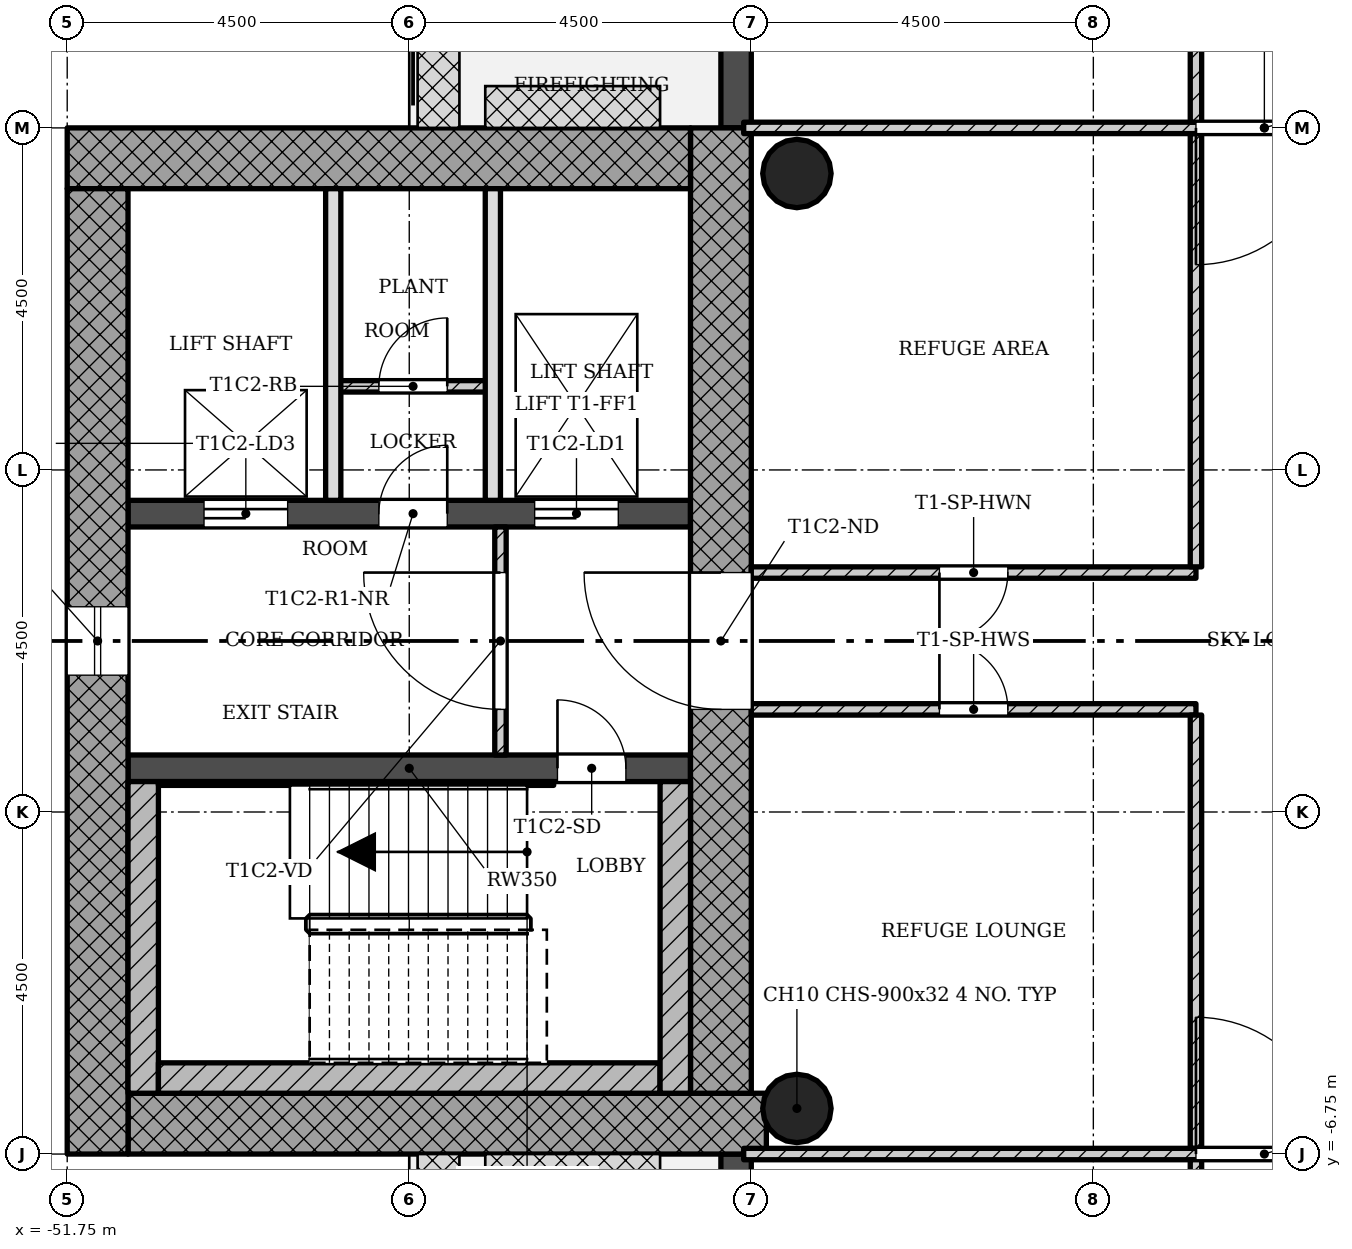
"""IFC4 building model, lengths in metres.
Left out: names, types, materials, properties, quantities, classifications, styles, units other than length and angle.
Written with IfcOpenShell. Run it as: python <this file> out.ifc"""

import sys

from ifc_helpers import new_model, si_unit, direction, frame, frame_2d, origin, origin_2d, place, context, subcontext, project, spatial, rectangle, hollow_circle, extrude, element, fill, save


model = new_model("IFC4")
c1 = context("Model", 3, precision=1e-05, world=origin(), true_north=direction((0.0, 1.0)))
c2 = subcontext(c1, "Body", "Model", "MODEL_VIEW")
j1 = project(units=[si_unit("LENGTHUNIT", "METRE"), si_unit("PLANEANGLEUNIT", "RADIAN")], contexts=[c1])
p1 = place(None, origin())
s1 = spatial("IfcSite", under=j1, at=p1, CompositionType="ELEMENT")
p2 = place(p1, origin())
s2 = spatial("IfcBuilding", under=s1, at=p2, CompositionType="ELEMENT")
p3 = place(p2, frame((0.0, 0.0, 181.3)))
s3 = spatial("IfcBuildingStorey", under=s2, at=p3, CompositionType="ELEMENT", Elevation=181.3)
p4 = place(p3, frame((-50.95, -6.35, 0.0), z_axis=(0.0, 0.0, 1.0), x_axis=(1.0, 0.0, 0.0)))
e1 = element("IfcWall", 1, at=p4, inside=s3, PredefinedType="SHEAR", context=c2, shape_type="SweptSolid", body=[
    extrude(rectangle(XDim=8.398, YDim=0.8, at=frame_2d((4.199, 0.0))), origin(), (0.0, 0.0, 1.0), 4.5),
])
p5 = place(p3, frame((-43.15, -5.95, 0.0), z_axis=(0.0, 0.0, 1.0), x_axis=(0.0, 1.0, 0.0)))
e2 = element("IfcWall", 2, at=p5, inside=s3, PredefinedType="SHEAR", context=c2, shape_type="SweptSolid", body=[
    extrude(rectangle(XDim=12.7, YDim=0.8, at=frame_2d((6.35, 0.0))), origin(), (0.0, 0.0, 1.0), 4.5),
])
p6 = place(p5, frame((5.05, 0.0, 0.0)))
e3 = element("IfcOpeningElement", 3, at=p6, cuts=e2, PredefinedType="OPENING", context=c2, shape_type="SweptSolid", body=[
    extrude(rectangle(XDim=1.8, YDim=2.1, at=frame_2d((0.9, 1.05))), frame((0.0, 0.41, 0.0), z_axis=(0.0, -1.0, 0.0), x_axis=(1.0, 0.0, 0.0)), (0.0, 0.0, 1.0), 0.82),
])
p7 = place(p3, frame((-43.55, 6.35, 0.0), z_axis=(0.0, 0.0, 1.0), x_axis=(-1.0, 0.0, 0.0)))
e4 = element("IfcWall", 4, at=p7, inside=s3, PredefinedType="SHEAR", context=c2, shape_type="SweptSolid", body=[
    extrude(rectangle(XDim=8.2, YDim=0.8, at=frame_2d((4.1, 0.0))), origin(), (0.0, 0.0, 1.0), 4.5),
])
p8 = place(p3, frame((-51.35, 5.95, 0.0), z_axis=(0.0, 0.0, 1.0), x_axis=(0.0, -1.0, 0.0)))
e5 = element("IfcWall", 5, at=p8, inside=s3, PredefinedType="SHEAR", context=c2, shape_type="SweptSolid", body=[
    extrude(rectangle(XDim=12.7, YDim=0.8, at=frame_2d((6.35, 0.0))), origin(), (0.0, 0.0, 1.0), 4.5),
])
p9 = place(p8, frame((5.5, 0.0, 0.45)))
e6 = element("IfcOpeningElement", 6, at=p9, cuts=e5, PredefinedType="OPENING", context=c2, shape_type="SweptSolid", body=[
    extrude(rectangle(XDim=0.9, YDim=2.4, at=frame_2d((0.45, 1.2))), frame((0.0, 0.41, 0.0), z_axis=(0.0, -1.0, 0.0), x_axis=(1.0, 0.0, 0.0)), (0.0, 0.0, 1.0), 0.82),
])
p10 = place(p3, frame((-50.95, -1.675, 0.0), z_axis=(0.0, 0.0, 1.0), x_axis=(1.0, 0.0, 0.0)))
e7 = element("IfcWall", 7, at=p10, inside=s3, PredefinedType="SHEAR", context=c2, shape_type="SweptSolid", body=[
    extrude(rectangle(XDim=7.4, YDim=0.35, at=frame_2d((3.7, 0.0))), origin(), (0.0, 0.0, 1.0), 4.5),
])
p11 = place(p10, frame((5.65, 0.0, 0.0)))
e8 = element("IfcOpeningElement", 8, at=p11, cuts=e7, PredefinedType="OPENING", context=c2, shape_type="SweptSolid", body=[
    extrude(rectangle(XDim=0.9, YDim=2.1, at=frame_2d((0.45, 1.05))), frame((0.0, 0.185, 0.0), z_axis=(0.0, -1.0, 0.0), x_axis=(1.0, 0.0, 0.0)), (0.0, 0.0, 1.0), 0.37),
])
p12 = place(p3, frame((-50.95, 1.675, 0.0), z_axis=(0.0, 0.0, 1.0), x_axis=(1.0, 0.0, 0.0)))
e9 = element("IfcWall", 9, at=p12, inside=s3, PredefinedType="SHEAR", context=c2, shape_type="SweptSolid", body=[
    extrude(rectangle(XDim=7.4, YDim=0.35, at=frame_2d((3.7, 0.0))), origin(), (0.0, 0.0, 1.0), 4.5),
])
p13 = place(p12, frame((5.35, 0.0, 0.0)))
e10 = element("IfcOpeningElement", 10, at=p13, cuts=e9, PredefinedType="OPENING", context=c2, shape_type="SweptSolid", body=[
    extrude(rectangle(XDim=1.1, YDim=2.1, at=frame_2d((0.55, 1.05))), frame((0.0, 0.185, 0.0), z_axis=(0.0, -1.0, 0.0), x_axis=(1.0, 0.0, 0.0)), (0.0, 0.0, 1.0), 0.37),
])
p14 = place(p12, frame((1.0, 0.0, 0.0)))
e11 = element("IfcOpeningElement", 11, at=p14, cuts=e9, PredefinedType="OPENING", context=c2, shape_type="SweptSolid", body=[
    extrude(rectangle(XDim=1.1, YDim=2.1, at=frame_2d((0.55, 1.05))), frame((0.0, 0.185, 0.0), z_axis=(0.0, -1.0, 0.0), x_axis=(1.0, 0.0, 0.0)), (0.0, 0.0, 1.0), 0.37),
])
p15 = place(p12, frame((3.3, 0.0, 0.0)))
e12 = element("IfcOpeningElement", 12, at=p15, cuts=e9, PredefinedType="OPENING", context=c2, shape_type="SweptSolid", body=[
    extrude(rectangle(XDim=0.9, YDim=2.1, at=frame_2d((0.45, 1.05))), frame((0.0, 0.185, 0.0), z_axis=(0.0, -1.0, 0.0), x_axis=(1.0, 0.0, 0.0)), (0.0, 0.0, 1.0), 0.37),
])
for number, where, z_axis, x_axis in (
    (13, (-42.15, -6.15, 0.0), (0.0, 0.0, 1.0), (1.0, 0.0, 0.0)),
    (14, (-42.15, 6.15, 0.0), (0.0, 0.0, 1.0), (1.0, 0.0, 0.0)),
):
    element("IfcColumn", number, at=place(p3, frame(where, z_axis=z_axis, x_axis=x_axis)), inside=s3, PredefinedType="COLUMN", context=c2, shape_type="SweptSolid", body=[
        extrude(hollow_circle(Radius=0.45, WallThickness=0.032, at=origin_2d()), origin(), (0.0, 0.0, 1.0), 4.5),
    ])
p16 = place(p3, frame((-42.95, -6.75, -0.02), z_axis=(0.0, 0.0, 1.0), x_axis=(0.0, -1.0, 0.0)))
e15 = element("IfcWall", 15, at=p16, inside=s3, PredefinedType="STANDARD", context=c2, shape_type="SweptSolid", body=[
    extrude(rectangle(XDim=4.5, YDim=0.4, at=frame_2d((2.25, 0.0))), origin(), (0.0, 0.0, 1.0), 4.22),
])
p17 = place(p16, frame((1.35, 0.0, 0.02)))
e16 = element("IfcOpeningElement", 16, at=p17, cuts=e15, PredefinedType="OPENING", context=c2, shape_type="SweptSolid", body=[
    extrude(rectangle(XDim=1.8, YDim=2.1, at=frame_2d((0.9, 1.05))), frame((0.0, 0.21, 0.0), z_axis=(0.0, -1.0, 0.0), x_axis=(1.0, 0.0, 0.0)), (0.0, 0.0, 1.0), 0.42),
])
p18 = place(p3, frame((-42.95, 11.25, -0.02), z_axis=(0.0, 0.0, 1.0), x_axis=(0.0, -1.0, 0.0)))
e17 = element("IfcWall", 17, at=p18, inside=s3, PredefinedType="STANDARD", context=c2, shape_type="SweptSolid", body=[
    extrude(rectangle(XDim=4.5, YDim=0.4, at=frame_2d((2.25, 0.0))), origin(), (0.0, 0.0, 1.0), 4.22),
])
p19 = place(p18, frame((1.35, 0.0, 0.02)))
e18 = element("IfcOpeningElement", 18, at=p19, cuts=e17, PredefinedType="OPENING", context=c2, shape_type="SweptSolid", body=[
    extrude(rectangle(XDim=1.8, YDim=2.1, at=frame_2d((0.9, 1.05))), frame((0.0, 0.21, 0.0), z_axis=(0.0, -1.0, 0.0), x_axis=(1.0, 0.0, 0.0)), (0.0, 0.0, 1.0), 0.42),
])
p20 = place(p3, frame((-46.05, 1.5, 0.0), z_axis=(0.0, 0.0, 1.0), x_axis=(0.0, -1.0, 0.0)))
e19 = element("IfcWall", 19, at=p20, inside=s3, PredefinedType="PARTITIONING", context=c2, shape_type="SweptSolid", body=[
    extrude(rectangle(XDim=3.0, YDim=0.15, at=frame_2d((1.5, 0.0))), origin(), (0.0, 0.0, 1.0), 4.08),
])
p21 = place(p20, frame((0.6, 0.0, 0.0)))
e20 = element("IfcOpeningElement", 20, at=p21, cuts=e19, PredefinedType="OPENING", context=c2, shape_type="SweptSolid", body=[
    extrude(rectangle(XDim=1.8, YDim=2.1, at=frame_2d((0.9, 1.05))), frame((0.0, 0.085, 0.0), z_axis=(0.0, -1.0, 0.0), x_axis=(1.0, 0.0, 0.0)), (0.0, 0.0, 1.0), 0.17),
])
for number, where, z_axis, x_axis in (
    (21, (-48.25, 5.95, 0.0), (0.0, 0.0, 1.0), (0.0, -1.0, 0.0)),
    (22, (-46.15, 5.95, 0.0), (0.0, 0.0, 1.0), (0.0, -1.0, 0.0)),
):
    element("IfcWall", number, at=place(p3, frame(where, z_axis=z_axis, x_axis=x_axis)), inside=s3, PredefinedType="SOLIDWALL", context=c2, shape_type="SweptSolid", body=[
        extrude(rectangle(XDim=4.1, YDim=0.2, at=frame_2d((2.05, 0.0))), origin(), (0.0, 0.0, 1.0), 4.08),
    ])
p22 = place(p3, frame((-46.15, 3.35, 0.0), z_axis=(0.0, 0.0, 1.0), x_axis=(-1.0, 0.0, 0.0)))
e23 = element("IfcWall", 23, at=p22, inside=s3, PredefinedType="PARTITIONING", context=c2, shape_type="SweptSolid", body=[
    extrude(rectangle(XDim=2.1, YDim=0.15, at=frame_2d((1.05, 0.0))), origin(), (0.0, 0.0, 1.0), 4.08),
])
p23 = place(p22, frame((0.6, 0.0, 0.0)))
e24 = element("IfcOpeningElement", 24, at=p23, cuts=e23, PredefinedType="OPENING", context=c2, shape_type="SweptSolid", body=[
    extrude(rectangle(XDim=0.9, YDim=2.1, at=frame_2d((0.45, 1.05))), frame((0.0, 0.085, 0.0), z_axis=(0.0, -1.0, 0.0), x_axis=(1.0, 0.0, 0.0)), (0.0, 0.0, 1.0), 0.17),
])
p24 = place(p3, frame((-42.75, 0.9, 0.0), z_axis=(0.0, 0.0, 1.0), x_axis=(1.0, 0.0, 0.0)))
e25 = element("IfcWall", 25, at=p24, inside=s3, PredefinedType="PARTITIONING", context=c2, shape_type="SweptSolid", body=[
    extrude(rectangle(XDim=5.85, YDim=0.15, at=frame_2d((2.925, 0.0))), origin(), (0.0, 0.0, 1.0), 4.08),
])
p25 = place(p24, frame((2.475, 0.0, 0.0)))
e26 = element("IfcOpeningElement", 26, at=p25, cuts=e25, PredefinedType="OPENING", context=c2, shape_type="SweptSolid", body=[
    extrude(rectangle(XDim=0.9, YDim=2.1, at=frame_2d((0.45, 1.05))), frame((0.0, 0.085, 0.0), z_axis=(0.0, -1.0, 0.0), x_axis=(1.0, 0.0, 0.0)), (0.0, 0.0, 1.0), 0.17),
])
p26 = place(p3, frame((-36.9, 0.975, 0.0), z_axis=(0.0, 0.0, 1.0), x_axis=(0.0, 1.0, 0.0)))
e27 = element("IfcWall", 27, at=p26, inside=s3, PredefinedType="PARTITIONING", context=c2, shape_type="SweptSolid", body=[
    extrude(rectangle(XDim=5.7, YDim=0.15, at=frame_2d((2.85, 0.0))), origin(), (0.0, 0.0, 1.0), 4.08),
])
p27 = place(p3, frame((-42.75, -0.9, 0.0), z_axis=(0.0, 0.0, 1.0), x_axis=(1.0, 0.0, 0.0)))
e28 = element("IfcWall", 28, at=p27, inside=s3, PredefinedType="PARTITIONING", context=c2, shape_type="SweptSolid", body=[
    extrude(rectangle(XDim=5.85, YDim=0.15, at=frame_2d((2.925, 0.0))), origin(), (0.0, 0.0, 1.0), 4.08),
])
p28 = place(p27, frame((2.475, 0.0, 0.0)))
e29 = element("IfcOpeningElement", 29, at=p28, cuts=e28, PredefinedType="OPENING", context=c2, shape_type="SweptSolid", body=[
    extrude(rectangle(XDim=0.9, YDim=2.1, at=frame_2d((0.45, 1.05))), frame((0.0, 0.085, 0.0), z_axis=(0.0, -1.0, 0.0), x_axis=(1.0, 0.0, 0.0)), (0.0, 0.0, 1.0), 0.17),
])
p29 = place(p3, frame((-36.9, -6.675, 0.0), z_axis=(0.0, 0.0, 1.0), x_axis=(0.0, 1.0, 0.0)))
e30 = element("IfcWall", 30, at=p29, inside=s3, PredefinedType="PARTITIONING", context=c2, shape_type="SweptSolid", body=[
    extrude(rectangle(XDim=5.7, YDim=0.15, at=frame_2d((2.85, 0.0))), origin(), (0.0, 0.0, 1.0), 4.08),
])
p30 = place(p3, frame((-42.85, 6.75, 0.0), z_axis=(0.0, 0.0, 1.0), x_axis=(1.0, 0.0, 0.0)))
e31 = element("IfcWall", 31, at=p30, inside=s3, PredefinedType="PARTITIONING", context=c2, shape_type="SweptSolid", body=[
    extrude(rectangle(XDim=13.7, YDim=0.15, at=frame_2d((6.85, 0.0))), origin(), (0.0, 0.0, 1.0), 4.08),
])
p31 = place(p30, frame((5.95, 0.0, 0.0)))
e32 = element("IfcOpeningElement", 32, at=p31, cuts=e31, PredefinedType="OPENING", context=c2, shape_type="SweptSolid", body=[
    extrude(rectangle(XDim=1.8, YDim=2.1, at=frame_2d((0.9, 1.05))), frame((0.0, 0.085, 0.0), z_axis=(0.0, -1.0, 0.0), x_axis=(1.0, 0.0, 0.0)), (0.0, 0.0, 1.0), 0.17),
])
p32 = place(p3, frame((-36.9, 6.825, 0.0), z_axis=(0.0, 0.0, 1.0), x_axis=(0.0, 1.0, 0.0)))
e33 = element("IfcWall", 33, at=p32, inside=s3, PredefinedType="PARTITIONING", context=c2, shape_type="SweptSolid", body=[
    extrude(rectangle(XDim=9.025, YDim=0.15, at=frame_2d((4.513, 0.0))), origin(), (0.0, 0.0, 1.0), 4.08),
])
p33 = place(p32, frame((1.8, 0.0, 0.0)))
e34 = element("IfcOpeningElement", 34, at=p33, cuts=e33, PredefinedType="OPENING", context=c2, shape_type="SweptSolid", body=[
    extrude(rectangle(XDim=0.9, YDim=2.1, at=frame_2d((0.45, 1.05))), frame((0.0, 0.085, 0.0), z_axis=(0.0, -1.0, 0.0), x_axis=(1.0, 0.0, 0.0)), (0.0, 0.0, 1.0), 0.17),
])
p34 = place(p32, frame((6.3, 0.0, 0.0)))
e35 = element("IfcOpeningElement", 35, at=p34, cuts=e33, PredefinedType="OPENING", context=c2, shape_type="SweptSolid", body=[
    extrude(rectangle(XDim=0.9, YDim=2.1, at=frame_2d((0.45, 1.05))), frame((0.0, 0.085, 0.0), z_axis=(0.0, -1.0, 0.0), x_axis=(1.0, 0.0, 0.0)), (0.0, 0.0, 1.0), 0.17),
])
p35 = place(p3, frame((-42.85, -6.75, 0.0), z_axis=(0.0, 0.0, 1.0), x_axis=(1.0, 0.0, 0.0)))
e36 = element("IfcWall", 36, at=p35, inside=s3, PredefinedType="PARTITIONING", context=c2, shape_type="SweptSolid", body=[
    extrude(rectangle(XDim=13.7, YDim=0.15, at=frame_2d((6.85, 0.0))), origin(), (0.0, 0.0, 1.0), 4.08),
])
p36 = place(p35, frame((5.95, 0.0, 0.0)))
e37 = element("IfcOpeningElement", 37, at=p36, cuts=e36, PredefinedType="OPENING", context=c2, shape_type="SweptSolid", body=[
    extrude(rectangle(XDim=1.8, YDim=2.1, at=frame_2d((0.9, 1.05))), frame((0.0, 0.085, 0.0), z_axis=(0.0, -1.0, 0.0), x_axis=(1.0, 0.0, 0.0)), (0.0, 0.0, 1.0), 0.17),
])
p37 = place(p3, frame((-36.9, -20.35, 0.0), z_axis=(0.0, 0.0, 1.0), x_axis=(0.0, 1.0, 0.0)))
e38 = element("IfcWall", 38, at=p37, inside=s3, PredefinedType="PARTITIONING", context=c2, shape_type="SweptSolid", body=[
    extrude(rectangle(XDim=13.525, YDim=0.15, at=frame_2d((6.763, 0.0))), origin(), (0.0, 0.0, 1.0), 4.08),
])
p38 = place(p37, frame((1.9, 0.0, 0.0)))
e39 = element("IfcOpeningElement", 39, at=p38, cuts=e38, PredefinedType="OPENING", context=c2, shape_type="SweptSolid", body=[
    extrude(rectangle(XDim=0.9, YDim=2.1, at=frame_2d((0.45, 1.05))), frame((0.0, 0.085, 0.0), z_axis=(0.0, -1.0, 0.0), x_axis=(1.0, 0.0, 0.0)), (0.0, 0.0, 1.0), 0.17),
])
p39 = place(p37, frame((6.4, 0.0, 0.0)))
e40 = element("IfcOpeningElement", 40, at=p39, cuts=e38, PredefinedType="OPENING", context=c2, shape_type="SweptSolid", body=[
    extrude(rectangle(XDim=0.9, YDim=2.1, at=frame_2d((0.45, 1.05))), frame((0.0, 0.085, 0.0), z_axis=(0.0, -1.0, 0.0), x_axis=(1.0, 0.0, 0.0)), (0.0, 0.0, 1.0), 0.17),
])
p40 = place(p37, frame((10.9, 0.0, 0.0)))
e41 = element("IfcOpeningElement", 41, at=p40, cuts=e38, PredefinedType="OPENING", context=c2, shape_type="SweptSolid", body=[
    extrude(rectangle(XDim=0.9, YDim=2.1, at=frame_2d((0.45, 1.05))), frame((0.0, 0.085, 0.0), z_axis=(0.0, -1.0, 0.0), x_axis=(1.0, 0.0, 0.0)), (0.0, 0.0, 1.0), 0.17),
])
p41 = place(p3, frame((-50.75, -1.85, 0.0), z_axis=(0.0, 0.0, 1.0), x_axis=(0.0, -1.0, 0.0)))
e42 = element("IfcWall", 42, at=p41, inside=s3, PredefinedType="SHEAR", context=c2, shape_type="SweptSolid", body=[
    extrude(rectangle(XDim=4.1, YDim=0.4, at=frame_2d((2.05, 0.0))), origin(), (0.0, 0.0, 1.0), 4.5),
])
p42 = place(p3, frame((-43.95, -5.75, 0.0), z_axis=(0.0, 0.0, 1.0), x_axis=(-1.0, 0.0, 0.0)))
e43 = element("IfcWall", 43, at=p42, inside=s3, PredefinedType="SHEAR", context=c2, shape_type="SweptSolid", body=[
    extrude(rectangle(XDim=6.6, YDim=0.4, at=frame_2d((3.3, 0.0))), origin(), (0.0, 0.0, 1.0), 4.5),
])
p43 = place(p3, frame((-43.75, -1.85, 0.0), z_axis=(0.0, 0.0, 1.0), x_axis=(0.0, -1.0, 0.0)))
e44 = element("IfcWall", 44, at=p43, inside=s3, PredefinedType="SHEAR", context=c2, shape_type="SweptSolid", body=[
    extrude(rectangle(XDim=4.1, YDim=0.4, at=frame_2d((2.05, 0.0))), origin(), (0.0, 0.0, 1.0), 4.5),
])
p44 = place(p3, frame((-45.35, -1.875, 0.0), z_axis=(0.0, 0.0, 1.0), x_axis=(-1.0, 0.0, 0.0)))
e45 = element("IfcWall", 45, at=p44, inside=s3, PredefinedType="SHEAR", context=c2, shape_type="SweptSolid", body=[
    extrude(rectangle(XDim=5.2, YDim=0.05, at=frame_2d((2.6, 0.0))), origin(), (0.0, 0.0, 1.0), 4.5),
])
p45 = place(p9, origin())
e46 = element("IfcWindow", 46, at=p45, inside=s3, PartitioningType="SINGLE_PANEL", PredefinedType="WINDOW", context=c2, shape_type="SweptSolid", body=[
    extrude(rectangle(XDim=0.9, YDim=2.4, at=frame_2d((0.45, 1.2))), frame((0.0, 0.03, 0.0), z_axis=(0.0, -1.0, 0.0), x_axis=(1.0, 0.0, 0.0)), (0.0, 0.0, 1.0), 0.06),
])
fill(e6, e46)
p46 = place(p21, origin())
e47 = element("IfcDoor", 47, at=p46, inside=s3, OperationType="SINGLE_SWING_LEFT", PredefinedType="DOOR", context=c2, shape_type="SweptSolid", body=[
    extrude(rectangle(XDim=1.8, YDim=2.1, at=frame_2d((0.9, 1.05))), frame((0.0, 0.025, 0.0), z_axis=(0.0, -1.0, 0.0), x_axis=(1.0, 0.0, 0.0)), (0.0, 0.0, 1.0), 0.05),
])
fill(e20, e47)
p47 = place(p23, origin())
e48 = element("IfcDoor", 48, at=p47, inside=s3, OperationType="SINGLE_SWING_LEFT", PredefinedType="DOOR", context=c2, shape_type="SweptSolid", body=[
    extrude(rectangle(XDim=0.9, YDim=2.1, at=frame_2d((0.45, 1.05))), frame((0.0, 0.025, 0.0), z_axis=(0.0, -1.0, 0.0), x_axis=(1.0, 0.0, 0.0)), (0.0, 0.0, 1.0), 0.05),
])
fill(e24, e48)
p48 = place(p25, origin())
e49 = element("IfcDoor", 49, at=p48, inside=s3, OperationType="SINGLE_SWING_LEFT", PredefinedType="DOOR", context=c2, shape_type="SweptSolid", body=[
    extrude(rectangle(XDim=0.9, YDim=2.1, at=frame_2d((0.45, 1.05))), frame((0.0, 0.025, 0.0), z_axis=(0.0, -1.0, 0.0), x_axis=(1.0, 0.0, 0.0)), (0.0, 0.0, 1.0), 0.05),
])
fill(e26, e49)
p49 = place(p28, origin())
e50 = element("IfcDoor", 50, at=p49, inside=s3, OperationType="SINGLE_SWING_RIGHT", PredefinedType="DOOR", context=c2, shape_type="SweptSolid", body=[
    extrude(rectangle(XDim=0.9, YDim=2.1, at=frame_2d((0.45, 1.05))), frame((0.0, 0.025, 0.0), z_axis=(0.0, -1.0, 0.0), x_axis=(1.0, 0.0, 0.0)), (0.0, 0.0, 1.0), 0.05),
])
fill(e29, e50)
p50 = place(p31, origin())
e51 = element("IfcDoor", 51, at=p50, inside=s3, OperationType="SINGLE_SWING_LEFT", PredefinedType="DOOR", context=c2, shape_type="SweptSolid", body=[
    extrude(rectangle(XDim=1.8, YDim=2.1, at=frame_2d((0.9, 1.05))), frame((0.0, 0.025, 0.0), z_axis=(0.0, -1.0, 0.0), x_axis=(1.0, 0.0, 0.0)), (0.0, 0.0, 1.0), 0.05),
])
fill(e32, e51)
p51 = place(p36, origin())
e52 = element("IfcDoor", 52, at=p51, inside=s3, OperationType="SINGLE_SWING_RIGHT", PredefinedType="DOOR", context=c2, shape_type="SweptSolid", body=[
    extrude(rectangle(XDim=1.8, YDim=2.1, at=frame_2d((0.9, 1.05))), frame((0.0, 0.025, 0.0), z_axis=(0.0, -1.0, 0.0), x_axis=(1.0, 0.0, 0.0)), (0.0, 0.0, 1.0), 0.05),
])
fill(e37, e52)
p52 = place(p11, origin())
e53 = element("IfcDoor", 53, at=p52, inside=s3, OperationType="SINGLE_SWING_RIGHT", PredefinedType="DOOR", context=c2, shape_type="SweptSolid", body=[
    extrude(rectangle(XDim=0.9, YDim=2.1, at=frame_2d((0.45, 1.05))), frame((0.0, 0.025, 0.0), z_axis=(0.0, -1.0, 0.0), x_axis=(1.0, 0.0, 0.0)), (0.0, 0.0, 1.0), 0.05),
])
fill(e8, e53)
p53 = place(p13, origin())
e54 = element("IfcDoor", 54, at=p53, inside=s3, OperationType="SLIDING_TO_LEFT", PredefinedType="DOOR", context=c2, shape_type="SweptSolid", body=[
    extrude(rectangle(XDim=1.1, YDim=2.1, at=frame_2d((0.55, 1.05))), frame((0.0, 0.025, 0.0), z_axis=(0.0, -1.0, 0.0), x_axis=(1.0, 0.0, 0.0)), (0.0, 0.0, 1.0), 0.05),
])
fill(e10, e54)
p54 = place(p14, origin())
e55 = element("IfcDoor", 55, at=p54, inside=s3, OperationType="SLIDING_TO_LEFT", PredefinedType="DOOR", context=c2, shape_type="SweptSolid", body=[
    extrude(rectangle(XDim=1.1, YDim=2.1, at=frame_2d((0.55, 1.05))), frame((0.0, 0.025, 0.0), z_axis=(0.0, -1.0, 0.0), x_axis=(1.0, 0.0, 0.0)), (0.0, 0.0, 1.0), 0.05),
])
fill(e11, e55)
p55 = place(p15, origin())
e56 = element("IfcDoor", 56, at=p55, inside=s3, OperationType="SINGLE_SWING_LEFT", PredefinedType="DOOR", context=c2, shape_type="SweptSolid", body=[
    extrude(rectangle(XDim=0.9, YDim=2.1, at=frame_2d((0.45, 1.05))), frame((0.0, 0.025, 0.0), z_axis=(0.0, -1.0, 0.0), x_axis=(1.0, 0.0, 0.0)), (0.0, 0.0, 1.0), 0.05),
])
fill(e12, e56)
p56 = place(p6, origin())
e57 = element("IfcDoor", 57, at=p56, inside=s3, OperationType="SINGLE_SWING_LEFT", PredefinedType="DOOR", context=c2, shape_type="SweptSolid", body=[
    extrude(rectangle(XDim=1.8, YDim=2.1, at=frame_2d((0.9, 1.05))), frame((0.0, 0.025, 0.0), z_axis=(0.0, -1.0, 0.0), x_axis=(1.0, 0.0, 0.0)), (0.0, 0.0, 1.0), 0.05),
])
fill(e3, e57)
save(model, sys.argv[1])
